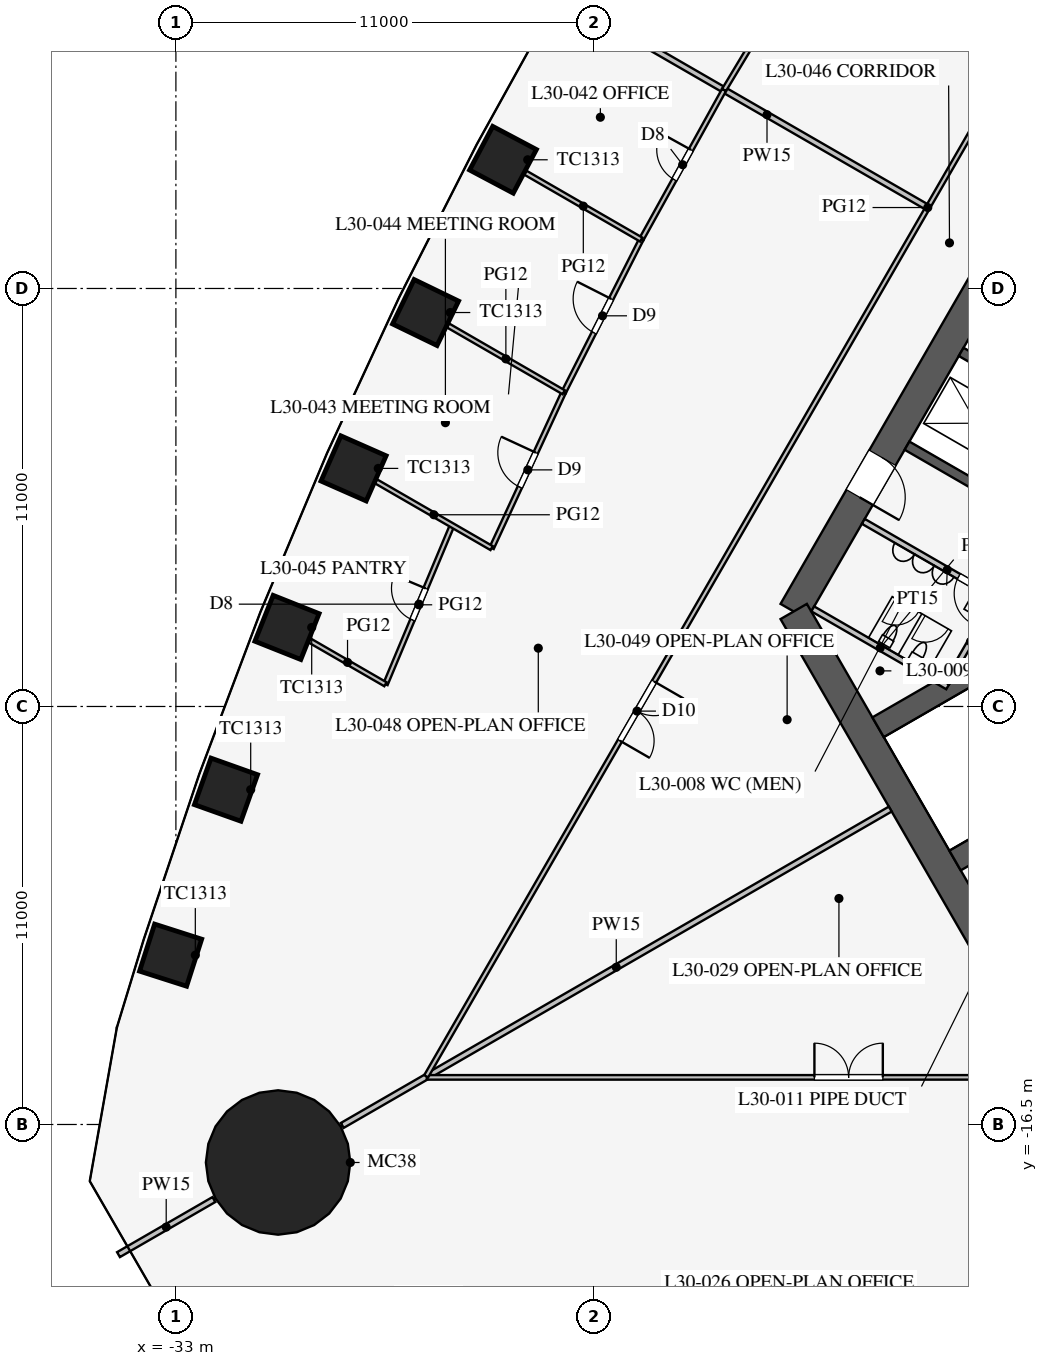
"""IFC4 building model, lengths in metres.
Left out: names, types, materials, properties, quantities, classifications, styles, units other than length and angle.
Written with IfcOpenShell. Run it as: python <this file> out.ifc"""

import sys

from ifc_helpers import new_model, si_unit, direction, frame, frame_2d, origin, origin_2d, place, context, subcontext, project, spatial, rectangle, circle, extrude, element, fill, save


model = new_model("IFC4")
c1 = context("Model", 3, precision=1e-05, world=origin(), true_north=direction((0.0, 1.0)))
c2 = subcontext(c1, "Body", "Model", "MODEL_VIEW")
j1 = project(units=[si_unit("LENGTHUNIT", "METRE"), si_unit("PLANEANGLEUNIT", "RADIAN")], contexts=[c1])
p1 = place(None, origin())
s1 = spatial("IfcSite", under=j1, at=p1, CompositionType="ELEMENT")
p2 = place(p1, origin())
s2 = spatial("IfcBuilding", under=s1, at=p2, CompositionType="ELEMENT")
p3 = place(p2, frame((0.0, 0.0, 132.5)))
s3 = spatial("IfcBuildingStorey", under=s2, at=p3, CompositionType="ELEMENT", Elevation=132.5)
for number, where, z_axis, x_axis in (
    (1, (-24.393, 8.887, 0.0), (0.0, 0.0, 1.0), (-0.468, -0.883, 0.0)),
    (2, (-26.43, 4.867, 0.0), (0.0, 0.0, 1.0), (-0.436, -0.9, 0.0)),
    (3, (-28.325, 0.765, 0.0), (0.0, 0.0, 1.0), (-0.403, -0.915, 0.0)),
    (4, (-30.077, -3.42, 0.0), (0.0, 0.0, 1.0), (-0.37, -0.929, 0.0)),
    (5, (-31.682, -7.689, 0.0), (0.0, 0.0, 1.0), (-0.336, -0.942, 0.0)),
    (6, (-33.139, -12.044, 0.0), (0.0, 0.0, 1.0), (-0.305, -0.952, 0.0)),
):
    element("IfcColumn", number, at=place(p3, frame(where, z_axis=z_axis, x_axis=x_axis)), inside=s3, PredefinedType="COLUMN", context=c2, shape_type="SweptSolid", body=[
        extrude(rectangle(XDim=1.3, YDim=1.3, at=origin_2d()), origin(), (0.0, 0.0, 1.0), 4.2),
    ])
p4 = place(p3, frame((-30.311, -17.5, 0.0), z_axis=(0.0, 0.0, 1.0), x_axis=(1.0, 0.0, 0.0)))
e7 = element("IfcColumn", 7, at=p4, inside=s3, PredefinedType="COLUMN", context=c2, shape_type="SweptSolid", body=[
    extrude(circle(Radius=1.9, at=origin_2d()), origin(), (0.0, 0.0, 1.0), 4.2),
])
p5 = place(p3, frame((-5.773, 16.0, 0.0), z_axis=(0.0, 0.0, 1.0), x_axis=(-0.500002442456, -0.866023993627, 0.0)))
e8 = element("IfcWall", 8, at=p5, inside=s3, PredefinedType="SHEAR", context=c2, shape_type="SweptSolid", body=[
    extrude(rectangle(XDim=21.939, YDim=0.8, at=frame_2d((10.97, 0.0))), origin(), (0.0, 0.0, 1.0), 4.2),
])
p6 = place(p5, frame((17.27, 0.0, 0.0)))
e9 = element("IfcOpeningElement", 9, at=p6, cuts=e8, PredefinedType="OPENING", context=c2, shape_type="SweptSolid", body=[
    extrude(rectangle(XDim=1.2, YDim=2.1, at=frame_2d((0.6, 1.05))), frame((0.0, 0.41, 0.0), z_axis=(0.0, -1.0, 0.0), x_axis=(1.0, 0.0, 0.0)), (0.0, 0.0, 1.0), 0.82),
])
p7 = place(p5, frame((3.47, 0.0, 0.0)))
e10 = element("IfcOpeningElement", 10, at=p7, cuts=e8, PredefinedType="OPENING", context=c2, shape_type="SweptSolid", body=[
    extrude(rectangle(XDim=1.2, YDim=2.1, at=frame_2d((0.6, 1.05))), frame((0.0, 0.41, 0.0), z_axis=(0.0, -1.0, 0.0), x_axis=(1.0, 0.0, 0.0)), (0.0, 0.0, 1.0), 0.82),
])
p8 = place(p3, frame((-16.743, -3.0, 0.0), z_axis=(0.0, 0.0, 1.0), x_axis=(0.499995765644, -0.866027848477, 0.0)))
e11 = element("IfcWall", 11, at=p8, inside=s3, PredefinedType="SHEAR", context=c2, shape_type="SweptSolid", body=[
    extrude(rectangle(XDim=11.547, YDim=0.8, at=frame_2d((5.773, 0.0))), origin(), (0.0, 0.0, 1.0), 4.2),
])
for number, where, z_axis, x_axis in (
    (12, (-10.107, 2.544, 0.0), (0.0, 0.0, 1.0), (-0.866, 0.5, 0.0)),
    (13, (-11.532, 0.076, 0.0), (0.0, 0.0, 1.0), (-0.866, 0.5, 0.0)),
):
    element("IfcWall", number, at=place(p3, frame(where, z_axis=z_axis, x_axis=x_axis)), inside=s3, PredefinedType="SHEAR", context=c2, shape_type="SweptSolid", body=[
        extrude(rectangle(XDim=2.575, YDim=0.25, at=frame_2d((1.288, 0.0))), origin(), (0.0, 0.0, 1.0), 4.2),
    ])
for number, where, z_axis, x_axis in (
    (14, (-6.663, -1.509, 0.0), (0.0, 0.0, 1.0), (-0.866, -0.5, 0.0)),
    (15, (-4.638, -5.016, 0.0), (0.0, 0.0, 1.0), (-0.866, -0.5, 0.0)),
):
    element("IfcWall", number, at=place(p3, frame(where, z_axis=z_axis, x_axis=x_axis)), inside=s3, PredefinedType="SHEAR", context=c2, shape_type="SweptSolid", body=[
        extrude(rectangle(XDim=9.075, YDim=0.6, at=frame_2d((4.538, 0.0))), origin(), (0.0, 0.0, 1.0), 4.2),
    ])
p9 = place(p3, frame((-10.495, -3.178, 0.0), z_axis=(0.0, 0.0, 1.0), x_axis=(-0.86602216432, 0.500005610874, 0.0)))
e16 = element("IfcWall", 16, at=p9, inside=s3, PredefinedType="PARTITIONING", context=c2, shape_type="SweptSolid", body=[
    extrude(rectangle(XDim=5.1, YDim=0.15, at=frame_2d((2.55, 0.0))), origin(), (0.0, 0.0, 1.0), 4.0),
])
p10 = place(p9, frame((1.3, 0.0, 0.0)))
e17 = element("IfcOpeningElement", 17, at=p10, cuts=e16, PredefinedType="OPENING", context=c2, shape_type="SweptSolid", body=[
    extrude(rectangle(XDim=0.9, YDim=2.1, at=frame_2d((0.45, 1.05))), frame((0.0, 0.085, 0.0), z_axis=(0.0, -1.0, 0.0), x_axis=(1.0, 0.0, 0.0)), (0.0, 0.0, 1.0), 0.17),
])
p11 = place(p3, frame((-12.691, -4.982, 0.0), z_axis=(0.0, 0.0, 1.0), x_axis=(-0.8660249478, 0.500000789788, 0.0)))
e18 = element("IfcWall", 18, at=p11, inside=s3, PredefinedType="PARTITIONING", context=c2, shape_type="SweptSolid", body=[
    extrude(rectangle(XDim=4.1, YDim=0.15, at=frame_2d((2.05, 0.0))), origin(), (0.0, 0.0, 1.0), 4.0),
])
p12 = place(p3, frame((-11.464, -2.706, 0.0), z_axis=(0.0, 0.0, 1.0), x_axis=(-0.50001992892, -0.866013897511, 0.0)))
e19 = element("IfcWall", 19, at=p12, inside=s3, PredefinedType="PARTITIONING", context=c2, shape_type="SweptSolid", body=[
    extrude(rectangle(XDim=2.51, YDim=0.15, at=frame_2d((1.255, 0.0))), origin(), (0.0, 0.0, 1.0), 4.0),
])
p13 = place(p3, frame((-14.203, -8.2, 0.0), z_axis=(0.0, 0.0, 1.0), x_axis=(-0.866024668836, -0.500001272966, 0.0)))
e20 = element("IfcWall", 20, at=p13, inside=s3, PredefinedType="PARTITIONING", context=c2, shape_type="SweptSolid", body=[
    extrude(rectangle(XDim=16.65, YDim=0.15, at=frame_2d((8.325, 0.0))), origin(), (0.0, 0.0, 1.0), 2.3),
])
p14 = place(p3, frame((-32.0, -18.475, 0.0), z_axis=(0.0, 0.0, 1.0), x_axis=(-0.866042548026, -0.499970304126, 0.0)))
e21 = element("IfcWall", 21, at=p14, inside=s3, PredefinedType="PARTITIONING", context=c2, shape_type="SweptSolid", body=[
    extrude(rectangle(XDim=2.899, YDim=0.15, at=frame_2d((1.45, 0.0))), origin(), (0.0, 0.0, 1.0), 2.3),
])
p15 = place(p3, frame((-26.398, -15.26, 0.0), z_axis=(0.0, 0.0, 1.0), x_axis=(1.0, 0.0, 0.0)))
e22 = element("IfcWall", 22, at=p15, inside=s3, PredefinedType="PARTITIONING", context=c2, shape_type="SweptSolid", body=[
    extrude(rectangle(XDim=52.796, YDim=0.12, at=frame_2d((26.398, 0.0))), origin(), (0.0, 0.0, 1.0), 2.9),
])
p16 = place(p15, frame((10.2, 0.0, 0.15)))
e23 = element("IfcOpeningElement", 23, at=p16, cuts=e22, PredefinedType="OPENING", context=c2, shape_type="SweptSolid", body=[
    extrude(rectangle(XDim=1.8, YDim=2.1, at=frame_2d((0.9, 1.05))), frame((0.0, 0.07, 0.0), z_axis=(0.0, -1.0, 0.0), x_axis=(1.0, 0.0, 0.0)), (0.0, 0.0, 1.0), 0.14),
])
p17 = place(p15, frame((40.8, 0.0, 0.15)))
e24 = element("IfcOpeningElement", 24, at=p17, cuts=e22, PredefinedType="OPENING", context=c2, shape_type="SweptSolid", body=[
    extrude(rectangle(XDim=1.8, YDim=2.1, at=frame_2d((0.9, 1.05))), frame((0.0, 0.07, 0.0), z_axis=(0.0, -1.0, 0.0), x_axis=(1.0, 0.0, 0.0)), (0.0, 0.0, 1.0), 0.14),
])
p18 = place(p3, frame((-13.268, 7.66, 0.0), z_axis=(0.0, 0.0, 1.0), x_axis=(-0.866015788683, 0.500016653474, 0.0)))
e25 = element("IfcWall", 25, at=p18, inside=s3, PredefinedType="PARTITIONING", context=c2, shape_type="SweptSolid", body=[
    extrude(rectangle(XDim=9.65, YDim=0.15, at=frame_2d((4.825, 0.0))), origin(), (0.0, 0.0, 1.0), 3.2),
])
p19 = place(p3, frame((-0.016, 30.491, 0.0), z_axis=(0.0, 0.0, 1.0), x_axis=(-0.50000091641, -0.866024874695, 0.0)))
e26 = element("IfcWall", 26, at=p19, inside=s3, PredefinedType="PARTITIONING", context=c2, shape_type="SweptSolid", body=[
    extrude(rectangle(XDim=52.796, YDim=0.12, at=frame_2d((26.398, 0.0))), origin(), (0.0, 0.0, 1.0), 2.9),
])
p20 = place(p19, frame((10.2, 0.0, 0.15)))
e27 = element("IfcOpeningElement", 27, at=p20, cuts=e26, PredefinedType="OPENING", context=c2, shape_type="SweptSolid", body=[
    extrude(rectangle(XDim=1.8, YDim=2.1, at=frame_2d((0.9, 1.05))), frame((0.0, 0.07, 0.0), z_axis=(0.0, -1.0, 0.0), x_axis=(1.0, 0.0, 0.0)), (0.0, 0.0, 1.0), 0.14),
])
p21 = place(p19, frame((40.8, 0.0, 0.15)))
e28 = element("IfcOpeningElement", 28, at=p21, cuts=e26, PredefinedType="OPENING", context=c2, shape_type="SweptSolid", body=[
    extrude(rectangle(XDim=1.8, YDim=2.1, at=frame_2d((0.9, 1.05))), frame((0.0, 0.07, 0.0), z_axis=(0.0, -1.0, 0.0), x_axis=(1.0, 0.0, 0.0)), (0.0, 0.0, 1.0), 0.14),
])
p22 = place(p3, frame((-18.576, 10.725, 0.0), z_axis=(0.0, 0.0, 1.0), x_axis=(-0.484292898211, -0.874905931368, 0.0)))
e29 = element("IfcWall", 29, at=p22, inside=s3, PredefinedType="PARTITIONING", context=c2, shape_type="SweptSolid", body=[
    extrude(rectangle(XDim=4.501, YDim=0.12, at=frame_2d((2.25, 0.0))), origin(), (0.0, 0.0, 1.0), 2.9),
])
p23 = place(p22, frame((1.8, 0.0, 0.15)))
e30 = element("IfcOpeningElement", 30, at=p23, cuts=e29, PredefinedType="OPENING", context=c2, shape_type="SweptSolid", body=[
    extrude(rectangle(XDim=0.9, YDim=2.1, at=frame_2d((0.45, 1.05))), frame((0.0, 0.07, 0.0), z_axis=(0.0, -1.0, 0.0), x_axis=(1.0, 0.0, 0.0)), (0.0, 0.0, 1.0), 0.14),
])
p24 = place(p3, frame((-25.731, -0.732, 0.0), z_axis=(0.0, 0.0, 1.0), x_axis=(-0.386742917128, -0.92218757097, 0.0)))
e31 = element("IfcWall", 31, at=p24, inside=s3, PredefinedType="PARTITIONING", context=c2, shape_type="SweptSolid", body=[
    extrude(rectangle(XDim=4.536, YDim=0.12, at=frame_2d((2.268, 0.0))), origin(), (0.0, 0.0, 1.0), 2.9),
])
p25 = place(p24, frame((1.8, 0.0, 0.15)))
e32 = element("IfcOpeningElement", 32, at=p25, cuts=e31, PredefinedType="OPENING", context=c2, shape_type="SweptSolid", body=[
    extrude(rectangle(XDim=0.9, YDim=2.1, at=frame_2d((0.45, 1.05))), frame((0.0, 0.07, 0.0), z_axis=(0.0, -1.0, 0.0), x_axis=(1.0, 0.0, 0.0)), (0.0, 0.0, 1.0), 0.14),
])
p26 = place(p3, frame((-20.756, 6.787, 0.0), z_axis=(0.0, 0.0, 1.0), x_axis=(-0.452471679136, -0.891778772779, 0.0)))
e33 = element("IfcWall", 33, at=p26, inside=s3, PredefinedType="PARTITIONING", context=c2, shape_type="SweptSolid", body=[
    extrude(rectangle(XDim=4.507, YDim=0.12, at=frame_2d((2.253, 0.0))), origin(), (0.0, 0.0, 1.0), 2.9),
])
p27 = place(p26, frame((1.75, 0.0, 0.15)))
e34 = element("IfcOpeningElement", 34, at=p27, cuts=e33, PredefinedType="OPENING", context=c2, shape_type="SweptSolid", body=[
    extrude(rectangle(XDim=1.0, YDim=2.1, at=frame_2d((0.5, 1.05))), frame((0.0, 0.07, 0.0), z_axis=(0.0, -1.0, 0.0), x_axis=(1.0, 0.0, 0.0)), (0.0, 0.0, 1.0), 0.14),
])
p28 = place(p3, frame((-22.795, 2.768, 0.0), z_axis=(0.0, 0.0, 1.0), x_axis=(-0.41992827805, -0.90755729367, 0.0)))
e35 = element("IfcWall", 35, at=p28, inside=s3, PredefinedType="PARTITIONING", context=c2, shape_type="SweptSolid", body=[
    extrude(rectangle(XDim=4.519, YDim=0.12, at=frame_2d((2.259, 0.0))), origin(), (0.0, 0.0, 1.0), 2.9),
])
p29 = place(p28, frame((1.75, 0.0, 0.15)))
e36 = element("IfcOpeningElement", 36, at=p29, cuts=e35, PredefinedType="OPENING", context=c2, shape_type="SweptSolid", body=[
    extrude(rectangle(XDim=1.0, YDim=2.1, at=frame_2d((0.5, 1.05))), frame((0.0, 0.07, 0.0), z_axis=(0.0, -1.0, 0.0), x_axis=(1.0, 0.0, 0.0)), (0.0, 0.0, 1.0), 0.14),
])
p30 = place(p3, frame((-16.256, 14.581, 0.0), z_axis=(0.0, 0.0, 1.0), x_axis=(-0.515548366618, -0.856860479703, 0.0)))
e37 = element("IfcWall", 37, at=p30, inside=s3, PredefinedType="PARTITIONING", context=c2, shape_type="SweptSolid", body=[
    extrude(rectangle(XDim=4.501, YDim=0.12, at=frame_2d((2.25, 0.0))), origin(), (0.0, 0.0, 1.0), 2.9),
])
p31 = place(p30, frame((1.8, 0.0, 0.15)))
e38 = element("IfcOpeningElement", 38, at=p31, cuts=e37, PredefinedType="OPENING", context=c2, shape_type="SweptSolid", body=[
    extrude(rectangle(XDim=0.9, YDim=2.1, at=frame_2d((0.45, 1.05))), frame((0.0, 0.07, 0.0), z_axis=(0.0, -1.0, 0.0), x_axis=(1.0, 0.0, 0.0)), (0.0, 0.0, 1.0), 0.14),
])
p32 = place(p3, frame((-24.692, -1.333, 0.0), z_axis=(0.0, 0.0, 1.0), x_axis=(-0.86600959659, 0.500027377864, 0.0)))
e39 = element("IfcWall", 39, at=p32, inside=s3, PredefinedType="PARTITIONING", context=c2, shape_type="SweptSolid", body=[
    extrude(rectangle(XDim=3.511, YDim=0.12, at=frame_2d((1.756, 0.0))), origin(), (0.0, 0.0, 1.0), 2.9),
])
p33 = place(p3, frame((-27.486, -4.916, 0.0), z_axis=(0.0, 0.0, 1.0), x_axis=(-0.865991504495, 0.500058710695, 0.0)))
e40 = element("IfcWall", 40, at=p33, inside=s3, PredefinedType="PARTITIONING", context=c2, shape_type="SweptSolid", body=[
    extrude(rectangle(XDim=2.304, YDim=0.12, at=frame_2d((1.152, 0.0))), origin(), (0.0, 0.0, 1.0), 2.9),
])
p34 = place(p3, frame((-20.756, 6.787, 0.0), z_axis=(0.0, 0.0, 1.0), x_axis=(-0.866027308682, 0.499996700606, 0.0)))
e41 = element("IfcWall", 41, at=p34, inside=s3, PredefinedType="PARTITIONING", context=c2, shape_type="SweptSolid", body=[
    extrude(rectangle(XDim=3.519, YDim=0.12, at=frame_2d((1.76, 0.0))), origin(), (0.0, 0.0, 1.0), 2.9),
])
p35 = place(p3, frame((-22.795, 2.768, 0.0), z_axis=(0.0, 0.0, 1.0), x_axis=(-0.866034119795, 0.499984903122, 0.0)))
e42 = element("IfcWall", 42, at=p35, inside=s3, PredefinedType="PARTITIONING", context=c2, shape_type="SweptSolid", body=[
    extrude(rectangle(XDim=3.516, YDim=0.12, at=frame_2d((1.758, 0.0))), origin(), (0.0, 0.0, 1.0), 2.9),
])
p36 = place(p10, origin())
e43 = element("IfcDoor", 43, at=p36, inside=s3, OperationType="SINGLE_SWING_LEFT", PredefinedType="DOOR", context=c2, shape_type="SweptSolid", body=[
    extrude(rectangle(XDim=0.9, YDim=2.1, at=frame_2d((0.45, 1.05))), frame((0.0, 0.025, 0.0), z_axis=(0.0, -1.0, 0.0), x_axis=(1.0, 0.0, 0.0)), (0.0, 0.0, 1.0), 0.05),
])
fill(e17, e43)
p37 = place(p6, origin())
e44 = element("IfcDoor", 44, at=p37, inside=s3, OperationType="SINGLE_SWING_RIGHT", PredefinedType="DOOR", context=c2, shape_type="SweptSolid", body=[
    extrude(rectangle(XDim=1.2, YDim=2.1, at=frame_2d((0.6, 1.05))), frame((0.0, 0.025, 0.0), z_axis=(0.0, -1.0, 0.0), x_axis=(1.0, 0.0, 0.0)), (0.0, 0.0, 1.0), 0.05),
])
fill(e9, e44)
p38 = place(p16, origin())
e45 = element("IfcDoor", 45, at=p38, inside=s3, OperationType="DOUBLE_DOOR_SINGLE_SWING", PredefinedType="DOOR", context=c2, shape_type="SweptSolid", body=[
    extrude(rectangle(XDim=1.8, YDim=2.1, at=frame_2d((0.9, 1.05))), frame((0.0, 0.025, 0.0), z_axis=(0.0, -1.0, 0.0), x_axis=(1.0, 0.0, 0.0)), (0.0, 0.0, 1.0), 0.05),
])
fill(e23, e45)
p39 = place(p23, frame((0.9, 0.0, 0.0), z_axis=(0.0, 0.0, 1.0), x_axis=(-1.0, 0.0, 0.0)))
e46 = element("IfcDoor", 46, at=p39, inside=s3, OperationType="SINGLE_SWING_RIGHT", PredefinedType="DOOR", context=c2, shape_type="SweptSolid", body=[
    extrude(rectangle(XDim=0.9, YDim=2.1, at=frame_2d((0.45, 1.05))), frame((0.0, 0.025, 0.0), z_axis=(0.0, -1.0, 0.0), x_axis=(1.0, 0.0, 0.0)), (0.0, 0.0, 1.0), 0.05),
])
fill(e30, e46)
p40 = place(p27, frame((1.0, 0.0, 0.0), z_axis=(0.0, 0.0, 1.0), x_axis=(-1.0, 0.0, 0.0)))
e47 = element("IfcDoor", 47, at=p40, inside=s3, OperationType="SINGLE_SWING_RIGHT", PredefinedType="DOOR", context=c2, shape_type="SweptSolid", body=[
    extrude(rectangle(XDim=1.0, YDim=2.1, at=frame_2d((0.5, 1.05))), frame((0.0, 0.025, 0.0), z_axis=(0.0, -1.0, 0.0), x_axis=(1.0, 0.0, 0.0)), (0.0, 0.0, 1.0), 0.05),
])
fill(e34, e47)
p41 = place(p29, frame((1.0, 0.0, 0.0), z_axis=(0.0, 0.0, 1.0), x_axis=(-1.0, 0.0, 0.0)))
e48 = element("IfcDoor", 48, at=p41, inside=s3, OperationType="SINGLE_SWING_RIGHT", PredefinedType="DOOR", context=c2, shape_type="SweptSolid", body=[
    extrude(rectangle(XDim=1.0, YDim=2.1, at=frame_2d((0.5, 1.05))), frame((0.0, 0.025, 0.0), z_axis=(0.0, -1.0, 0.0), x_axis=(1.0, 0.0, 0.0)), (0.0, 0.0, 1.0), 0.05),
])
fill(e36, e48)
p42 = place(p25, frame((0.9, 0.0, 0.0), z_axis=(0.0, 0.0, 1.0), x_axis=(-1.0, 0.0, 0.0)))
e49 = element("IfcDoor", 49, at=p42, inside=s3, OperationType="SINGLE_SWING_RIGHT", PredefinedType="DOOR", context=c2, shape_type="SweptSolid", body=[
    extrude(rectangle(XDim=0.9, YDim=2.1, at=frame_2d((0.45, 1.05))), frame((0.0, 0.025, 0.0), z_axis=(0.0, -1.0, 0.0), x_axis=(1.0, 0.0, 0.0)), (0.0, 0.0, 1.0), 0.05),
])
fill(e32, e49)
p43 = place(p21, origin())
e50 = element("IfcDoor", 50, at=p43, inside=s3, OperationType="DOUBLE_DOOR_SINGLE_SWING", PredefinedType="DOOR", context=c2, shape_type="SweptSolid", body=[
    extrude(rectangle(XDim=1.8, YDim=2.1, at=frame_2d((0.9, 1.05))), frame((0.0, 0.025, 0.0), z_axis=(0.0, -1.0, 0.0), x_axis=(1.0, 0.0, 0.0)), (0.0, 0.0, 1.0), 0.05),
])
fill(e28, e50)
save(model, sys.argv[1])
